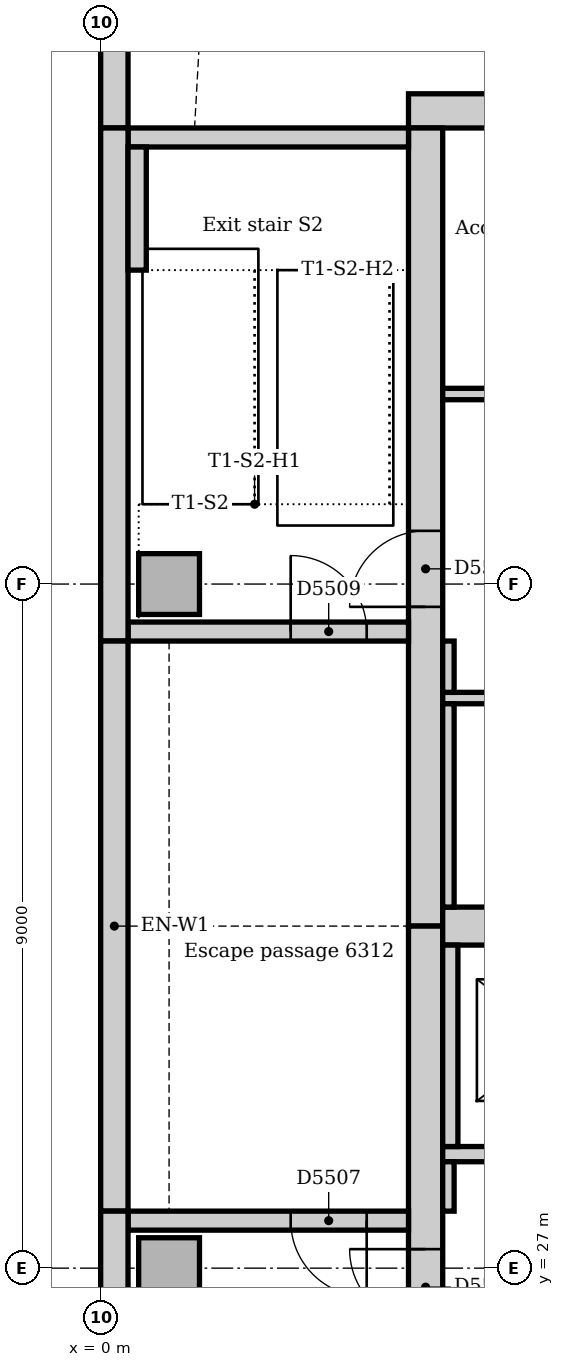
"""IFC4 building model, lengths in metres.
Left out: names, types, materials, properties, quantities, classifications, styles, units other than length and angle.
Written with IfcOpenShell. Run it as: python <this file> out.ifc"""

import sys

from ifc_helpers import new_model, si_unit, direction, frame, frame_2d, origin, origin_2d, place, context, subcontext, project, spatial, rectangle, extrude, element, fill, save


model = new_model("IFC4")
c1 = context("Model", 3, precision=1e-05, world=origin(), true_north=direction((0.0, 1.0)))
c2 = subcontext(c1, "Body", "Model", "MODEL_VIEW")
j1 = project(units=[si_unit("LENGTHUNIT", "METRE"), si_unit("PLANEANGLEUNIT", "RADIAN")], contexts=[c1])
p1 = place(None, origin())
s1 = spatial("IfcSite", under=j1, at=p1, CompositionType="ELEMENT")
p2 = place(p1, origin())
s2 = spatial("IfcBuilding", under=s1, at=p2, CompositionType="ELEMENT")
p3 = place(p2, frame((0.0, 0.0, 263.0)))
s3 = spatial("IfcBuildingStorey", under=s2, at=p3, CompositionType="ELEMENT", Elevation=263.0)
p4 = place(p3, frame((22.95, 42.225, 0.0), z_axis=(0.0, 0.0, 1.0), x_axis=(-1.0, 0.0, 0.0)))
e1 = element("IfcWall", 1, at=p4, inside=s3, PredefinedType="SOLIDWALL", context=c2, shape_type="SweptSolid", body=[
    extrude(rectangle(XDim=18.9, YDim=0.45, at=frame_2d((9.45, 0.0))), origin(), (0.0, 0.0, 1.0), 4.0),
])
p5 = place(p3, frame((4.275, 42.0, 0.0), z_axis=(0.0, 0.0, 1.0), x_axis=(0.0, -1.0, 0.0)))
e2 = element("IfcWall", 2, at=p5, inside=s3, PredefinedType="SOLIDWALL", context=c2, shape_type="SweptSolid", body=[
    extrude(rectangle(XDim=10.5, YDim=0.45, at=frame_2d((5.25, 0.0))), origin(), (0.0, 0.0, 1.0), 4.0),
])
p6 = place(p5, frame((5.3, 0.0, 0.0)))
e3 = element("IfcOpeningElement", 3, at=p6, cuts=e2, PredefinedType="OPENING", context=c2, shape_type="SweptSolid", body=[
    extrude(rectangle(XDim=1.0, YDim=2.1, at=frame_2d((0.5, 1.05))), frame((0.0, 0.235, 0.0), z_axis=(0.0, -1.0, 0.0), x_axis=(1.0, 0.0, 0.0)), (0.0, 0.0, 1.0), 0.47),
])
p7 = place(p3, frame((4.275, 31.5, 0.0), z_axis=(0.0, 0.0, 1.0), x_axis=(0.0, -1.0, 0.0)))
e4 = element("IfcWall", 4, at=p7, inside=s3, PredefinedType="SOLIDWALL", context=c2, shape_type="SweptSolid", body=[
    extrude(rectangle(XDim=10.5, YDim=0.45, at=frame_2d((5.25, 0.0))), origin(), (0.0, 0.0, 1.0), 4.0),
])
p8 = place(p7, frame((4.25, 0.0, 0.0)))
e5 = element("IfcOpeningElement", 5, at=p8, cuts=e4, PredefinedType="OPENING", context=c2, shape_type="SweptSolid", body=[
    extrude(rectangle(XDim=1.0, YDim=2.1, at=frame_2d((0.5, 1.05))), frame((0.0, 0.235, 0.0), z_axis=(0.0, -1.0, 0.0), x_axis=(1.0, 0.0, 0.0)), (0.0, 0.0, 1.0), 0.47),
])
p9 = place(p3, frame((4.5, 31.5, 0.0), z_axis=(0.0, 0.0, 1.0), x_axis=(1.0, 0.0, 0.0)))
e6 = element("IfcWall", 6, at=p9, inside=s3, PredefinedType="SOLIDWALL", context=c2, shape_type="SweptSolid", body=[
    extrude(rectangle(XDim=18.0, YDim=0.5, at=frame_2d((9.0, 0.0))), origin(), (0.0, 0.0, 1.0), 4.0),
])
p10 = place(p3, frame((4.05, 27.625, 0.0), z_axis=(0.0, 0.0, 1.0), x_axis=(-1.0, 0.0, 0.0)))
e7 = element("IfcWall", 7, at=p10, inside=s3, PredefinedType="SOLIDWALL", context=c2, shape_type="SweptSolid", body=[
    extrude(rectangle(XDim=3.69, YDim=0.25, at=frame_2d((1.845, 0.0))), origin(), (0.0, 0.0, 1.0), 4.0),
])
p11 = place(p10, frame((0.55, 0.0, 0.0)))
e8 = element("IfcOpeningElement", 8, at=p11, cuts=e7, PredefinedType="OPENING", context=c2, shape_type="SweptSolid", body=[
    extrude(rectangle(XDim=1.0, YDim=2.1, at=frame_2d((0.5, 1.05))), frame((0.0, 0.135, 0.0), z_axis=(0.0, -1.0, 0.0), x_axis=(1.0, 0.0, 0.0)), (0.0, 0.0, 1.0), 0.27),
])
p12 = place(p3, frame((0.36, 35.375, 0.0), z_axis=(0.0, 0.0, 1.0), x_axis=(1.0, 0.0, 0.0)))
e9 = element("IfcWall", 9, at=p12, inside=s3, PredefinedType="SOLIDWALL", context=c2, shape_type="SweptSolid", body=[
    extrude(rectangle(XDim=3.69, YDim=0.25, at=frame_2d((1.845, 0.0))), origin(), (0.0, 0.0, 1.0), 4.0),
])
p13 = place(p12, frame((2.14, 0.0, 0.0)))
e10 = element("IfcOpeningElement", 10, at=p13, cuts=e9, PredefinedType="OPENING", context=c2, shape_type="SweptSolid", body=[
    extrude(rectangle(XDim=1.0, YDim=2.1, at=frame_2d((0.5, 1.05))), frame((0.0, 0.135, 0.0), z_axis=(0.0, -1.0, 0.0), x_axis=(1.0, 0.0, 0.0)), (0.0, 0.0, 1.0), 0.27),
])
p14 = place(p3, frame((4.05, 41.875, 0.0), z_axis=(0.0, 0.0, 1.0), x_axis=(-1.0, 0.0, 0.0)))
e11 = element("IfcWall", 11, at=p14, inside=s3, PredefinedType="SOLIDWALL", context=c2, shape_type="SweptSolid", body=[
    extrude(rectangle(XDim=3.69, YDim=0.25, at=frame_2d((1.845, 0.0))), origin(), (0.0, 0.0, 1.0), 4.0),
])
for number, where, z_axis, x_axis in (
    (12, (0.9, 27.0, 0.0), (0.0, 0.0, 1.0), (1.0, 0.0, 0.0)),
    (13, (0.9, 36.0, 0.0), (0.0, 0.0, 1.0), (1.0, 0.0, 0.0)),
):
    element("IfcColumn", number, at=place(p3, frame(where, z_axis=z_axis, x_axis=x_axis)), inside=s3, PredefinedType="COLUMN", context=c2, shape_type="SweptSolid", body=[
        extrude(rectangle(XDim=0.8, YDim=0.8, at=origin_2d()), origin(), (0.0, 0.0, 1.0), 4.0),
    ])
p15 = place(p3, frame((0.18, 58.757, 0.0), z_axis=(0.0, 0.0, 1.0), x_axis=(0.0, -1.0, 0.0)))
e14 = element("IfcWall", 14, at=p15, inside=s3, PredefinedType="STANDARD", context=c2, shape_type="SweptSolid", body=[
    extrude(rectangle(XDim=16.757, YDim=0.36, at=frame_2d((8.379, 0.0))), origin(), (0.0, 0.0, 1.0), 3.85),
])
p16 = place(p15, frame((3.107, 0.0, 0.9)))
e15 = element("IfcOpeningElement", 15, at=p16, cuts=e14, PredefinedType="OPENING", context=c2, shape_type="SweptSolid", body=[
    extrude(rectangle(XDim=3.3, YDim=1.6, at=frame_2d((1.65, 0.8))), frame((0.0, 0.19, 0.0), z_axis=(0.0, -1.0, 0.0), x_axis=(1.0, 0.0, 0.0)), (0.0, 0.0, 1.0), 0.38),
])
p17 = place(p15, frame((7.607, 0.0, 0.9)))
e16 = element("IfcOpeningElement", 16, at=p17, cuts=e14, PredefinedType="OPENING", context=c2, shape_type="SweptSolid", body=[
    extrude(rectangle(XDim=3.3, YDim=1.6, at=frame_2d((1.65, 0.8))), frame((0.0, 0.19, 0.0), z_axis=(0.0, -1.0, 0.0), x_axis=(1.0, 0.0, 0.0)), (0.0, 0.0, 1.0), 0.38),
])
p18 = place(p15, frame((12.107, 0.0, 0.9)))
e17 = element("IfcOpeningElement", 17, at=p18, cuts=e14, PredefinedType="OPENING", context=c2, shape_type="SweptSolid", body=[
    extrude(rectangle(XDim=3.3, YDim=1.6, at=frame_2d((1.65, 0.8))), frame((0.0, 0.19, 0.0), z_axis=(0.0, -1.0, 0.0), x_axis=(1.0, 0.0, 0.0)), (0.0, 0.0, 1.0), 0.38),
])
p19 = place(p3, frame((0.18, 42.0, 0.0), z_axis=(0.0, 0.0, 1.0), x_axis=(0.0, -1.0, 0.0)))
e18 = element("IfcWall", 18, at=p19, inside=s3, PredefinedType="STANDARD", context=c2, shape_type="SweptSolid", body=[
    extrude(rectangle(XDim=6.75, YDim=0.36, at=frame_2d((3.375, 0.0))), origin(), (0.0, 0.0, 1.0), 3.85),
])
p20 = place(p3, frame((0.18, 35.25, 0.0), z_axis=(0.0, 0.0, 1.0), x_axis=(0.0, -1.0, 0.0)))
e19 = element("IfcWall", 19, at=p20, inside=s3, PredefinedType="STANDARD", context=c2, shape_type="SweptSolid", body=[
    extrude(rectangle(XDim=7.5, YDim=0.36, at=frame_2d((3.75, 0.0))), origin(), (0.0, 0.0, 1.0), 3.85),
])
p21 = place(p3, frame((0.18, 27.75, 0.0), z_axis=(0.0, 0.0, 1.0), x_axis=(0.0, -1.0, 0.0)))
e20 = element("IfcWall", 20, at=p21, inside=s3, PredefinedType="STANDARD", context=c2, shape_type="SweptSolid", body=[
    extrude(rectangle(XDim=5.507, YDim=0.36, at=frame_2d((2.754, 0.0))), origin(), (0.0, 0.0, 1.0), 3.85),
])
p22 = place(p3, frame((0.48, 40.13, 0.0), z_axis=(0.0, 0.0, 1.0), x_axis=(0.0, 1.0, 0.0)))
e21 = element("IfcWall", 21, at=p22, inside=s3, PredefinedType="STANDARD", context=c2, shape_type="SweptSolid", body=[
    extrude(rectangle(XDim=1.62, YDim=0.24, at=frame_2d((0.81, 0.0))), origin(), (0.0, 0.0, 1.0), 4.0),
])
p23 = place(p3, frame((4.5, 28.5, 0.0), z_axis=(0.0, 0.0, 1.0), x_axis=(1.0, 0.0, 0.0)))
e22 = element("IfcWall", 22, at=p23, inside=s3, PredefinedType="PARTITIONING", context=c2, shape_type="SweptSolid", body=[
    extrude(rectangle(XDim=18.0, YDim=0.2, at=frame_2d((9.0, 0.0))), origin(), (0.0, 0.0, 1.0), 3.85),
])
p24 = place(p23, frame((0.95, 0.0, 0.0)))
e23 = element("IfcOpeningElement", 23, at=p24, cuts=e22, PredefinedType="OPENING", context=c2, shape_type="SweptSolid", body=[
    extrude(rectangle(XDim=1.1, YDim=2.1, at=frame_2d((0.55, 1.05))), frame((0.0, 0.11, 0.0), z_axis=(0.0, -1.0, 0.0), x_axis=(1.0, 0.0, 0.0)), (0.0, 0.0, 1.0), 0.22),
])
p25 = place(p23, frame((3.95, 0.0, 0.0)))
e24 = element("IfcOpeningElement", 24, at=p25, cuts=e22, PredefinedType="OPENING", context=c2, shape_type="SweptSolid", body=[
    extrude(rectangle(XDim=1.1, YDim=2.1, at=frame_2d((0.55, 1.05))), frame((0.0, 0.11, 0.0), z_axis=(0.0, -1.0, 0.0), x_axis=(1.0, 0.0, 0.0)), (0.0, 0.0, 1.0), 0.22),
])
p26 = place(p23, frame((6.95, 0.0, 0.0)))
e25 = element("IfcOpeningElement", 25, at=p26, cuts=e22, PredefinedType="OPENING", context=c2, shape_type="SweptSolid", body=[
    extrude(rectangle(XDim=1.1, YDim=2.1, at=frame_2d((0.55, 1.05))), frame((0.0, 0.11, 0.0), z_axis=(0.0, -1.0, 0.0), x_axis=(1.0, 0.0, 0.0)), (0.0, 0.0, 1.0), 0.22),
])
p27 = place(p23, frame((9.95, 0.0, 0.0)))
e26 = element("IfcOpeningElement", 26, at=p27, cuts=e22, PredefinedType="OPENING", context=c2, shape_type="SweptSolid", body=[
    extrude(rectangle(XDim=1.1, YDim=2.1, at=frame_2d((0.55, 1.05))), frame((0.0, 0.11, 0.0), z_axis=(0.0, -1.0, 0.0), x_axis=(1.0, 0.0, 0.0)), (0.0, 0.0, 1.0), 0.22),
])
p28 = place(p23, frame((12.95, 0.0, 0.0)))
e27 = element("IfcOpeningElement", 27, at=p28, cuts=e22, PredefinedType="OPENING", context=c2, shape_type="SweptSolid", body=[
    extrude(rectangle(XDim=1.1, YDim=2.1, at=frame_2d((0.55, 1.05))), frame((0.0, 0.11, 0.0), z_axis=(0.0, -1.0, 0.0), x_axis=(1.0, 0.0, 0.0)), (0.0, 0.0, 1.0), 0.22),
])
p29 = place(p23, frame((15.95, 0.0, 0.0)))
e28 = element("IfcOpeningElement", 28, at=p29, cuts=e22, PredefinedType="OPENING", context=c2, shape_type="SweptSolid", body=[
    extrude(rectangle(XDim=1.1, YDim=2.1, at=frame_2d((0.55, 1.05))), frame((0.0, 0.11, 0.0), z_axis=(0.0, -1.0, 0.0), x_axis=(1.0, 0.0, 0.0)), (0.0, 0.0, 1.0), 0.22),
])
p30 = place(p3, frame((4.6, 28.6, 0.0), z_axis=(0.0, 0.0, 1.0), x_axis=(0.0, 1.0, 0.0)))
e29 = element("IfcWall", 29, at=p30, inside=s3, PredefinedType="PARTITIONING", context=c2, shape_type="SweptSolid", body=[
    extrude(rectangle(XDim=2.65, YDim=0.2, at=frame_2d((1.325, 0.0))), origin(), (0.0, 0.0, 1.0), 3.85),
])
p31 = place(p3, frame((4.5, 38.5, 0.0), z_axis=(0.0, 0.0, 1.0), x_axis=(1.0, 0.0, 0.0)))
e30 = element("IfcWall", 30, at=p31, inside=s3, PredefinedType="PARTITIONING", context=c2, shape_type="SweptSolid", body=[
    extrude(rectangle(XDim=11.9, YDim=0.15, at=frame_2d((5.95, 0.0))), origin(), (0.0, 0.0, 1.0), 3.85),
])
p32 = place(p31, frame((1.1, 0.0, 0.0)))
e31 = element("IfcOpeningElement", 31, at=p32, cuts=e30, PredefinedType="OPENING", context=c2, shape_type="SweptSolid", body=[
    extrude(rectangle(XDim=0.9, YDim=2.1, at=frame_2d((0.45, 1.05))), frame((0.0, 0.085, 0.0), z_axis=(0.0, -1.0, 0.0), x_axis=(1.0, 0.0, 0.0)), (0.0, 0.0, 1.0), 0.17),
])
p33 = place(p31, frame((4.8, 0.0, 0.0)))
e32 = element("IfcOpeningElement", 32, at=p33, cuts=e30, PredefinedType="OPENING", context=c2, shape_type="SweptSolid", body=[
    extrude(rectangle(XDim=0.9, YDim=2.1, at=frame_2d((0.45, 1.05))), frame((0.0, 0.085, 0.0), z_axis=(0.0, -1.0, 0.0), x_axis=(1.0, 0.0, 0.0)), (0.0, 0.0, 1.0), 0.17),
])
p34 = place(p31, frame((7.8, 0.0, 0.0)))
e33 = element("IfcOpeningElement", 33, at=p34, cuts=e30, PredefinedType="OPENING", context=c2, shape_type="SweptSolid", body=[
    extrude(rectangle(XDim=0.9, YDim=2.1, at=frame_2d((0.45, 1.05))), frame((0.0, 0.085, 0.0), z_axis=(0.0, -1.0, 0.0), x_axis=(1.0, 0.0, 0.0)), (0.0, 0.0, 1.0), 0.17),
])
p35 = place(p31, frame((9.95, 0.0, 0.0)))
e34 = element("IfcOpeningElement", 34, at=p35, cuts=e30, PredefinedType="OPENING", context=c2, shape_type="SweptSolid", body=[
    extrude(rectangle(XDim=0.8, YDim=2.1, at=frame_2d((0.4, 1.05))), frame((0.0, 0.085, 0.0), z_axis=(0.0, -1.0, 0.0), x_axis=(1.0, 0.0, 0.0)), (0.0, 0.0, 1.0), 0.17),
])
p36 = place(p3, frame((4.5, 34.5, 0.0), z_axis=(0.0, 0.0, 1.0), x_axis=(1.0, 0.0, 0.0)))
e35 = element("IfcWall", 35, at=p36, inside=s3, PredefinedType="PARTITIONING", context=c2, shape_type="SweptSolid", body=[
    extrude(rectangle(XDim=5.9, YDim=0.15, at=frame_2d((2.95, 0.0))), origin(), (0.0, 0.0, 1.0), 3.85),
])
p37 = place(p36, frame((2.5, 0.0, 0.0)))
e36 = element("IfcOpeningElement", 36, at=p37, cuts=e35, PredefinedType="OPENING", context=c2, shape_type="SweptSolid", body=[
    extrude(rectangle(XDim=0.9, YDim=2.1, at=frame_2d((0.45, 1.05))), frame((0.0, 0.085, 0.0), z_axis=(0.0, -1.0, 0.0), x_axis=(1.0, 0.0, 0.0)), (0.0, 0.0, 1.0), 0.17),
])
p38 = place(p3, frame((4.575, 34.575, 0.0), z_axis=(0.0, 0.0, 1.0), x_axis=(0.0, 1.0, 0.0)))
e37 = element("IfcWall", 37, at=p38, inside=s3, PredefinedType="PARTITIONING", context=c2, shape_type="SweptSolid", body=[
    extrude(rectangle(XDim=0.675, YDim=0.15, at=frame_2d((0.338, 0.0))), origin(), (0.0, 0.0, 1.0), 3.85),
])
p39 = place(p3, frame((4.575, 31.75, 0.0), z_axis=(0.0, 0.0, 1.0), x_axis=(0.0, 1.0, 0.0)))
e38 = element("IfcWall", 38, at=p39, inside=s3, PredefinedType="PARTITIONING", context=c2, shape_type="SweptSolid", body=[
    extrude(rectangle(XDim=2.675, YDim=0.15, at=frame_2d((1.337, 0.0))), origin(), (0.0, 0.0, 1.0), 3.85),
])
p40 = place(p3, frame((4.575, 27.75, 0.0), z_axis=(0.0, 0.0, 1.0), x_axis=(0.0, 1.0, 0.0)))
e39 = element("IfcWall", 39, at=p40, inside=s3, PredefinedType="PARTITIONING", context=c2, shape_type="SweptSolid", body=[
    extrude(rectangle(XDim=0.65, YDim=0.15, at=frame_2d((0.325, 0.0))), origin(), (0.0, 0.0, 1.0), 3.85),
])
p41 = place(p8, frame((1.0, 0.0, 0.0), z_axis=(0.0, 0.0, 1.0), x_axis=(-1.0, 0.0, 0.0)))
e40 = element("IfcDoor", 40, at=p41, inside=s3, OperationType="SINGLE_SWING_RIGHT", PredefinedType="DOOR", context=c2, shape_type="SweptSolid", body=[
    extrude(rectangle(XDim=1.0, YDim=2.1, at=frame_2d((0.5, 1.05))), frame((0.0, 0.025, 0.0), z_axis=(0.0, -1.0, 0.0), x_axis=(1.0, 0.0, 0.0)), (0.0, 0.0, 1.0), 0.05),
])
fill(e5, e40)
p42 = place(p11, origin())
e41 = element("IfcDoor", 41, at=p42, inside=s3, OperationType="SINGLE_SWING_LEFT", PredefinedType="DOOR", context=c2, shape_type="SweptSolid", body=[
    extrude(rectangle(XDim=1.0, YDim=2.1, at=frame_2d((0.5, 1.05))), frame((0.0, 0.025, 0.0), z_axis=(0.0, -1.0, 0.0), x_axis=(1.0, 0.0, 0.0)), (0.0, 0.0, 1.0), 0.05),
])
fill(e8, e41)
p43 = place(p6, frame((1.0, 0.0, 0.0), z_axis=(0.0, 0.0, 1.0), x_axis=(-1.0, 0.0, 0.0)))
e42 = element("IfcDoor", 42, at=p43, inside=s3, OperationType="SINGLE_SWING_LEFT", PredefinedType="DOOR", context=c2, shape_type="SweptSolid", body=[
    extrude(rectangle(XDim=1.0, YDim=2.1, at=frame_2d((0.5, 1.05))), frame((0.0, 0.025, 0.0), z_axis=(0.0, -1.0, 0.0), x_axis=(1.0, 0.0, 0.0)), (0.0, 0.0, 1.0), 0.05),
])
fill(e3, e42)
p44 = place(p13, origin())
e43 = element("IfcDoor", 43, at=p44, inside=s3, OperationType="SINGLE_SWING_LEFT", PredefinedType="DOOR", context=c2, shape_type="SweptSolid", body=[
    extrude(rectangle(XDim=1.0, YDim=2.1, at=frame_2d((0.5, 1.05))), frame((0.0, 0.025, 0.0), z_axis=(0.0, -1.0, 0.0), x_axis=(1.0, 0.0, 0.0)), (0.0, 0.0, 1.0), 0.05),
])
fill(e10, e43)
save(model, sys.argv[1])
